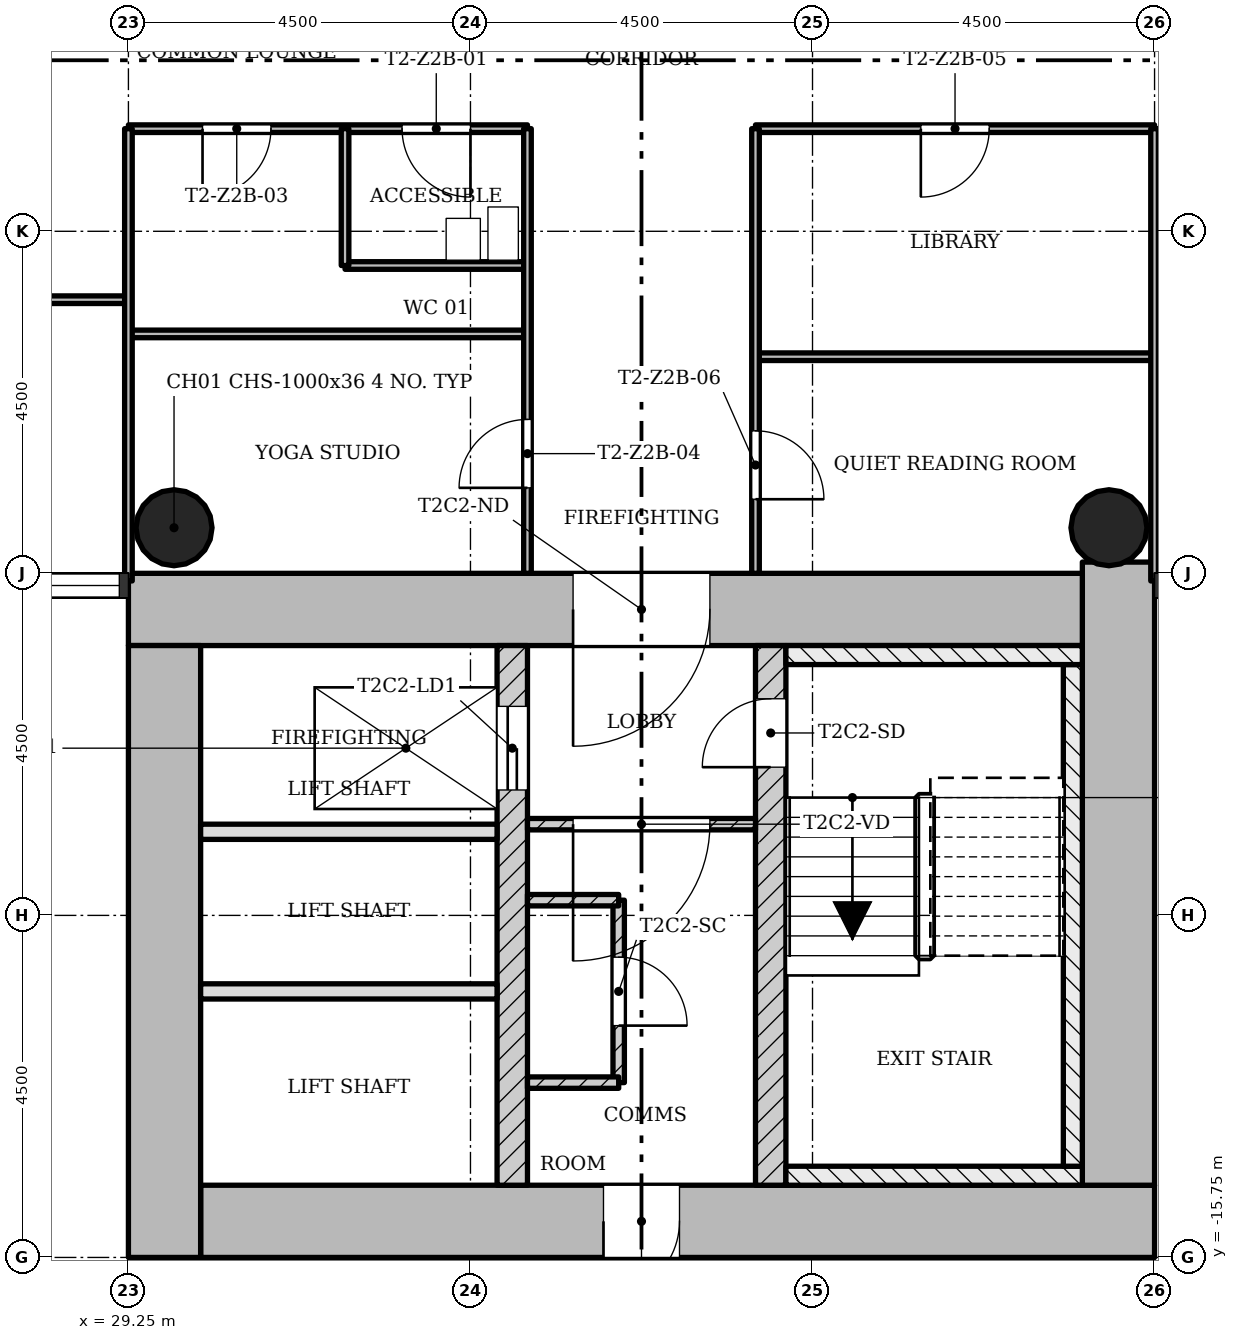
"""IFC4 building model, lengths in metres.
Left out: names, types, materials, properties, quantities, classifications, styles, units other than length and angle.
Written with IfcOpenShell. Run it as: python <this file> out.ifc"""

import sys

from ifc_helpers import new_model, si_unit, direction, frame, frame_2d, origin, origin_2d, place, context, subcontext, project, spatial, rectangle, hollow_circle, extrude, element, fill, save


model = new_model("IFC4")
c1 = context("Model", 3, precision=1e-05, world=origin(), true_north=direction((0.0, 1.0)))
c2 = subcontext(c1, "Body", "Model", "MODEL_VIEW")
j1 = project(units=[si_unit("LENGTHUNIT", "METRE"), si_unit("PLANEANGLEUNIT", "RADIAN")], contexts=[c1])
p1 = place(None, origin())
s1 = spatial("IfcSite", under=j1, at=p1, CompositionType="ELEMENT")
p2 = place(p1, origin())
s2 = spatial("IfcBuilding", under=s1, at=p2, CompositionType="ELEMENT")
p3 = place(p2, frame((0.0, 0.0, 76.6)))
s3 = spatial("IfcBuildingStorey", under=s2, at=p3, CompositionType="ELEMENT", Elevation=76.6)
p4 = place(p3, frame((30.2, -15.275, 0.0), z_axis=(0.0, 0.0, 1.0), x_axis=(1.0, 0.0, 0.0)))
e1 = element("IfcWall", 1, at=p4, inside=s3, PredefinedType="SHEAR", context=c2, shape_type="SweptSolid", body=[
    extrude(rectangle(XDim=12.55, YDim=0.95, at=frame_2d((6.275, 0.0))), origin(), (0.0, 0.0, 1.0), 3.4),
])
p5 = place(p4, frame((5.3, 0.0, 0.0)))
e2 = element("IfcOpeningElement", 2, at=p5, cuts=e1, PredefinedType="OPENING", context=c2, shape_type="SweptSolid", body=[
    extrude(rectangle(XDim=1.0, YDim=2.1, at=frame_2d((0.5, 1.05))), frame((0.0, 0.485, 0.0), z_axis=(0.0, -1.0, 0.0), x_axis=(1.0, 0.0, 0.0)), (0.0, 0.0, 1.0), 0.97),
])
p6 = place(p3, frame((42.275, -14.8, 0.0), z_axis=(0.0, 0.0, 1.0), x_axis=(0.0, 1.0, 0.0)))
e3 = element("IfcWall", 3, at=p6, inside=s3, PredefinedType="SHEAR", context=c2, shape_type="SweptSolid", body=[
    extrude(rectangle(XDim=8.198, YDim=0.95, at=frame_2d((4.099, 0.0))), origin(), (0.0, 0.0, 1.0), 3.4),
])
p7 = place(p3, frame((41.8, -7.225, 0.0), z_axis=(0.0, 0.0, 1.0), x_axis=(-1.0, 0.0, 0.0)))
e4 = element("IfcWall", 4, at=p7, inside=s3, PredefinedType="SHEAR", context=c2, shape_type="SweptSolid", body=[
    extrude(rectangle(XDim=12.55, YDim=0.95, at=frame_2d((6.275, 0.0))), origin(), (0.0, 0.0, 1.0), 3.4),
])
p8 = place(p7, frame((4.9, 0.0, 0.0)))
e5 = element("IfcOpeningElement", 5, at=p8, cuts=e4, PredefinedType="OPENING", context=c2, shape_type="SweptSolid", body=[
    extrude(rectangle(XDim=1.8, YDim=2.1, at=frame_2d((0.9, 1.05))), frame((0.0, 0.485, 0.0), z_axis=(0.0, -1.0, 0.0), x_axis=(1.0, 0.0, 0.0)), (0.0, 0.0, 1.0), 0.97),
])
p9 = place(p3, frame((29.725, -7.7, 0.0), z_axis=(0.0, 0.0, 1.0), x_axis=(0.0, -1.0, 0.0)))
e6 = element("IfcWall", 6, at=p9, inside=s3, PredefinedType="SHEAR", context=c2, shape_type="SweptSolid", body=[
    extrude(rectangle(XDim=8.05, YDim=0.95, at=frame_2d((4.025, 0.0))), origin(), (0.0, 0.0, 1.0), 3.4),
])
p10 = place(p3, frame((34.3, -14.8, 0.0), z_axis=(0.0, 0.0, 1.0), x_axis=(0.0, 1.0, 0.0)))
e7 = element("IfcWall", 7, at=p10, inside=s3, PredefinedType="SHEAR", context=c2, shape_type="SweptSolid", body=[
    extrude(rectangle(XDim=7.1, YDim=0.4, at=frame_2d((3.55, 0.0))), origin(), (0.0, 0.0, 1.0), 3.4),
])
p11 = place(p10, frame((5.2, 0.0, 0.0)))
e8 = element("IfcOpeningElement", 8, at=p11, cuts=e7, PredefinedType="OPENING", context=c2, shape_type="SweptSolid", body=[
    extrude(rectangle(XDim=1.1, YDim=2.1, at=frame_2d((0.55, 1.05))), frame((0.0, 0.21, 0.0), z_axis=(0.0, -1.0, 0.0), x_axis=(1.0, 0.0, 0.0)), (0.0, 0.0, 1.0), 0.42),
])
p12 = place(p3, frame((37.7, -14.8, 0.0), z_axis=(0.0, 0.0, 1.0), x_axis=(0.0, 1.0, 0.0)))
e9 = element("IfcWall", 9, at=p12, inside=s3, PredefinedType="SHEAR", context=c2, shape_type="SweptSolid", body=[
    extrude(rectangle(XDim=7.1, YDim=0.4, at=frame_2d((3.55, 0.0))), origin(), (0.0, 0.0, 1.0), 3.4),
])
p13 = place(p12, frame((5.5, 0.0, 0.0)))
e10 = element("IfcOpeningElement", 10, at=p13, cuts=e9, PredefinedType="OPENING", context=c2, shape_type="SweptSolid", body=[
    extrude(rectangle(XDim=0.9, YDim=2.1, at=frame_2d((0.45, 1.05))), frame((0.0, 0.21, 0.0), z_axis=(0.0, -1.0, 0.0), x_axis=(1.0, 0.0, 0.0)), (0.0, 0.0, 1.0), 0.42),
])
for number, where, z_axis, x_axis in (
    (11, (42.15, -6.15, 0.0), (0.0, 0.0, 1.0), (1.0, 0.0, 0.0)),
    (12, (29.85, -6.15, 0.0), (0.0, 0.0, 1.0), (1.0, 0.0, 0.0)),
):
    element("IfcColumn", number, at=place(p3, frame(where, z_axis=z_axis, x_axis=x_axis)), inside=s3, PredefinedType="COLUMN", context=c2, shape_type="SweptSolid", body=[
        extrude(hollow_circle(Radius=0.5, WallThickness=0.036, at=origin_2d()), origin(), (0.0, 0.0, 1.0), 3.4),
    ])
p14 = place(p3, frame((34.5, -10.05, 0.0), z_axis=(0.0, 0.0, 1.0), x_axis=(1.0, 0.0, 0.0)))
e13 = element("IfcWall", 13, at=p14, inside=s3, PredefinedType="PARTITIONING", context=c2, shape_type="SweptSolid", body=[
    extrude(rectangle(XDim=3.0, YDim=0.15, at=frame_2d((1.5, 0.0))), origin(), (0.0, 0.0, 1.0), 3.0),
])
p15 = place(p14, frame((0.6, 0.0, 0.0)))
e14 = element("IfcOpeningElement", 14, at=p15, cuts=e13, PredefinedType="OPENING", context=c2, shape_type="SweptSolid", body=[
    extrude(rectangle(XDim=1.8, YDim=2.1, at=frame_2d((0.9, 1.05))), frame((0.0, 0.085, 0.0), z_axis=(0.0, -1.0, 0.0), x_axis=(1.0, 0.0, 0.0)), (0.0, 0.0, 1.0), 0.17),
])
for number, where, z_axis, x_axis in (
    (15, (30.2, -10.15, 0.0), (0.0, 0.0, 1.0), (1.0, 0.0, 0.0)),
    (16, (30.2, -12.25, 0.0), (0.0, 0.0, 1.0), (1.0, 0.0, 0.0)),
):
    element("IfcWall", number, at=place(p3, frame(where, z_axis=z_axis, x_axis=x_axis)), inside=s3, PredefinedType="SOLIDWALL", context=c2, shape_type="SweptSolid", body=[
        extrude(rectangle(XDim=3.9, YDim=0.2, at=frame_2d((1.95, 0.0))), origin(), (0.0, 0.0, 1.0), 3.0),
    ])
p16 = place(p3, frame((35.7, -11.05, 0.0), z_axis=(0.0, 0.0, 1.0), x_axis=(0.0, -1.0, 0.0)))
e17 = element("IfcWall", 17, at=p16, inside=s3, PredefinedType="PARTITIONING", context=c2, shape_type="SweptSolid", body=[
    extrude(rectangle(XDim=2.4, YDim=0.15, at=frame_2d((1.2, 0.0))), origin(), (0.0, 0.0, 1.0), 3.0),
])
p17 = place(p16, frame((0.75, 0.0, 0.0)))
e18 = element("IfcOpeningElement", 18, at=p17, cuts=e17, PredefinedType="OPENING", context=c2, shape_type="SweptSolid", body=[
    extrude(rectangle(XDim=0.9, YDim=2.1, at=frame_2d((0.45, 1.05))), frame((0.0, 0.085, 0.0), z_axis=(0.0, -1.0, 0.0), x_axis=(1.0, 0.0, 0.0)), (0.0, 0.0, 1.0), 0.17),
])
for number, where, z_axis, x_axis in (
    (19, (35.7, -11.05, 0.0), (0.0, 0.0, 1.0), (-1.0, 0.0, 0.0)),
    (20, (35.7, -13.45, 0.0), (0.0, 0.0, 1.0), (-1.0, 0.0, 0.0)),
):
    element("IfcWall", number, at=place(p3, frame(where, z_axis=z_axis, x_axis=x_axis)), inside=s3, PredefinedType="PARTITIONING", context=c2, shape_type="SweptSolid", body=[
        extrude(rectangle(XDim=1.2, YDim=0.15, at=frame_2d((0.6, 0.0))), origin(), (0.0, 0.0, 1.0), 3.0),
    ])
for number, where, z_axis, x_axis in (
    (21, (42.75, -3.9, 0.0), (0.0, 0.0, 1.0), (-1.0, 0.0, 0.0)),
    (22, (34.5, -3.6, 0.0), (0.0, 0.0, 1.0), (-1.0, 0.0, 0.0)),
):
    element("IfcWall", number, at=place(p3, frame(where, z_axis=z_axis, x_axis=x_axis)), inside=s3, PredefinedType="PARTITIONING", context=c2, shape_type="SweptSolid", body=[
        extrude(rectangle(XDim=5.25, YDim=0.1, at=frame_2d((2.625, 0.0))), origin(), (0.0, 0.0, 1.0), 3.0),
    ])
p18 = place(p3, frame((51.75, -3.15, 0.0), z_axis=(0.0, 0.0, 1.0), x_axis=(-1.0, 0.0, 0.0)))
e23 = element("IfcWall", 23, at=p18, inside=s3, PredefinedType="PARTITIONING", context=c2, shape_type="SweptSolid", body=[
    extrude(rectangle(XDim=9.0, YDim=0.1, at=frame_2d((4.5, 0.0))), origin(), (0.0, 0.0, 1.0), 3.0),
])
p19 = place(p18, frame((5.55, 0.0, 0.0)))
e24 = element("IfcOpeningElement", 24, at=p19, cuts=e23, PredefinedType="OPENING", context=c2, shape_type="SweptSolid", body=[
    extrude(rectangle(XDim=0.9, YDim=2.1, at=frame_2d((0.45, 1.05))), frame((0.0, 0.06, 0.0), z_axis=(0.0, -1.0, 0.0), x_axis=(1.0, 0.0, 0.0)), (0.0, 0.0, 1.0), 0.12),
])
p20 = place(p3, frame((29.25, -3.15, 0.0), z_axis=(0.0, 0.0, 1.0), x_axis=(-1.0, 0.0, 0.0)))
e25 = element("IfcWall", 25, at=p20, inside=s3, PredefinedType="PARTITIONING", context=c2, shape_type="SweptSolid", body=[
    extrude(rectangle(XDim=9.0, YDim=0.1, at=frame_2d((4.5, 0.0))), origin(), (0.0, 0.0, 1.0), 3.0),
])
p21 = place(p20, frame((2.55, 0.0, 0.0)))
e26 = element("IfcOpeningElement", 26, at=p21, cuts=e25, PredefinedType="OPENING", context=c2, shape_type="SweptSolid", body=[
    extrude(rectangle(XDim=0.9, YDim=2.1, at=frame_2d((0.45, 1.05))), frame((0.0, 0.06, 0.0), z_axis=(0.0, -1.0, 0.0), x_axis=(1.0, 0.0, 0.0)), (0.0, 0.0, 1.0), 0.12),
])
p22 = place(p3, frame((34.5, -2.7, 0.0), z_axis=(0.0, 0.0, 1.0), x_axis=(-1.0, 0.0, 0.0)))
e27 = element("IfcWall", 27, at=p22, inside=s3, PredefinedType="PARTITIONING", context=c2, shape_type="SweptSolid", body=[
    extrude(rectangle(XDim=2.4, YDim=0.1, at=frame_2d((1.2, 0.0))), origin(), (0.0, 0.0, 1.0), 3.0),
])
p23 = place(p3, frame((42.75, -0.9, 0.0), z_axis=(0.0, 0.0, 1.0), x_axis=(-1.0, 0.0, 0.0)))
e28 = element("IfcWall", 28, at=p23, inside=s3, PredefinedType="PARTITIONING", context=c2, shape_type="SweptSolid", body=[
    extrude(rectangle(XDim=5.25, YDim=0.1, at=frame_2d((2.625, 0.0))), origin(), (0.0, 0.0, 1.0), 3.0),
])
p24 = place(p23, frame((2.175, 0.0, 0.0)))
e29 = element("IfcOpeningElement", 29, at=p24, cuts=e28, PredefinedType="OPENING", context=c2, shape_type="SweptSolid", body=[
    extrude(rectangle(XDim=0.9, YDim=2.1, at=frame_2d((0.45, 1.05))), frame((0.0, 0.06, 0.0), z_axis=(0.0, -1.0, 0.0), x_axis=(1.0, 0.0, 0.0)), (0.0, 0.0, 1.0), 0.12),
])
p25 = place(p3, frame((34.5, -0.9, 0.0), z_axis=(0.0, 0.0, 1.0), x_axis=(-1.0, 0.0, 0.0)))
e30 = element("IfcWall", 30, at=p25, inside=s3, PredefinedType="PARTITIONING", context=c2, shape_type="SweptSolid", body=[
    extrude(rectangle(XDim=5.25, YDim=0.1, at=frame_2d((2.625, 0.0))), origin(), (0.0, 0.0, 1.0), 3.0),
])
p26 = place(p25, frame((0.75, 0.0, 0.0)))
e31 = element("IfcOpeningElement", 31, at=p26, cuts=e30, PredefinedType="OPENING", context=c2, shape_type="SweptSolid", body=[
    extrude(rectangle(XDim=0.9, YDim=2.1, at=frame_2d((0.45, 1.05))), frame((0.0, 0.06, 0.0), z_axis=(0.0, -1.0, 0.0), x_axis=(1.0, 0.0, 0.0)), (0.0, 0.0, 1.0), 0.12),
])
p27 = place(p25, frame((3.375, 0.0, 0.0)))
e32 = element("IfcOpeningElement", 32, at=p27, cuts=e30, PredefinedType="OPENING", context=c2, shape_type="SweptSolid", body=[
    extrude(rectangle(XDim=0.9, YDim=2.1, at=frame_2d((0.45, 1.05))), frame((0.0, 0.06, 0.0), z_axis=(0.0, -1.0, 0.0), x_axis=(1.0, 0.0, 0.0)), (0.0, 0.0, 1.0), 0.12),
])
p28 = place(p3, frame((42.75, -6.85, 0.0), z_axis=(0.0, 0.0, 1.0), x_axis=(0.0, 1.0, 0.0)))
e33 = element("IfcWall", 33, at=p28, inside=s3, PredefinedType="PARTITIONING", context=c2, shape_type="SweptSolid", body=[
    extrude(rectangle(XDim=5.95, YDim=0.1, at=frame_2d((2.975, 0.0))), origin(), (0.0, 0.0, 1.0), 3.0),
])
p29 = place(p3, frame((37.5, -6.75, 0.0), z_axis=(0.0, 0.0, 1.0), x_axis=(0.0, 1.0, 0.0)))
e34 = element("IfcWall", 34, at=p29, inside=s3, PredefinedType="PARTITIONING", context=c2, shape_type="SweptSolid", body=[
    extrude(rectangle(XDim=5.85, YDim=0.1, at=frame_2d((2.925, 0.0))), origin(), (0.0, 0.0, 1.0), 3.0),
])
p30 = place(p29, frame((0.975, 0.0, 0.0)))
e35 = element("IfcOpeningElement", 35, at=p30, cuts=e34, PredefinedType="OPENING", context=c2, shape_type="SweptSolid", body=[
    extrude(rectangle(XDim=0.9, YDim=2.1, at=frame_2d((0.45, 1.05))), frame((0.0, 0.06, 0.0), z_axis=(0.0, -1.0, 0.0), x_axis=(1.0, 0.0, 0.0)), (0.0, 0.0, 1.0), 0.12),
])
p31 = place(p3, frame((34.5, -6.75, 0.0), z_axis=(0.0, 0.0, 1.0), x_axis=(0.0, 1.0, 0.0)))
e36 = element("IfcWall", 36, at=p31, inside=s3, PredefinedType="PARTITIONING", context=c2, shape_type="SweptSolid", body=[
    extrude(rectangle(XDim=5.85, YDim=0.1, at=frame_2d((2.925, 0.0))), origin(), (0.0, 0.0, 1.0), 3.0),
])
p32 = place(p31, frame((1.125, 0.0, 0.0)))
e37 = element("IfcOpeningElement", 37, at=p32, cuts=e36, PredefinedType="OPENING", context=c2, shape_type="SweptSolid", body=[
    extrude(rectangle(XDim=0.9, YDim=2.1, at=frame_2d((0.45, 1.05))), frame((0.0, 0.06, 0.0), z_axis=(0.0, -1.0, 0.0), x_axis=(1.0, 0.0, 0.0)), (0.0, 0.0, 1.0), 0.12),
])
p33 = place(p3, frame((32.1, -2.7, 0.0), z_axis=(0.0, 0.0, 1.0), x_axis=(0.0, 1.0, 0.0)))
e38 = element("IfcWall", 38, at=p33, inside=s3, PredefinedType="PARTITIONING", context=c2, shape_type="SweptSolid", body=[
    extrude(rectangle(XDim=1.8, YDim=0.1, at=frame_2d((0.9, 0.0))), origin(), (0.0, 0.0, 1.0), 3.0),
])
p34 = place(p3, frame((29.25, -6.85, 0.0), z_axis=(0.0, 0.0, 1.0), x_axis=(0.0, 1.0, 0.0)))
e39 = element("IfcWall", 39, at=p34, inside=s3, PredefinedType="PARTITIONING", context=c2, shape_type="SweptSolid", body=[
    extrude(rectangle(XDim=5.95, YDim=0.1, at=frame_2d((2.975, 0.0))), origin(), (0.0, 0.0, 1.0), 3.0),
])
p35 = place(p3, frame((37.9, -14.675, 0.0), z_axis=(0.0, 0.0, 1.0), x_axis=(1.0, 0.0, 0.0)))
e40 = element("IfcWall", 40, at=p35, inside=s3, PredefinedType="SHEAR", context=c2, shape_type="SweptSolid", body=[
    extrude(rectangle(XDim=3.9, YDim=0.25, at=frame_2d((1.95, 0.0))), origin(), (0.0, 0.0, 1.0), 3.4),
])
p36 = place(p3, frame((41.675, -7.95, 0.0), z_axis=(0.0, 0.0, 1.0), x_axis=(0.0, -1.0, 0.0)))
e41 = element("IfcWall", 41, at=p36, inside=s3, PredefinedType="SHEAR", context=c2, shape_type="SweptSolid", body=[
    extrude(rectangle(XDim=6.6, YDim=0.25, at=frame_2d((3.3, 0.0))), origin(), (0.0, 0.0, 1.0), 3.4),
])
p37 = place(p3, frame((37.9, -7.825, 0.0), z_axis=(0.0, 0.0, 1.0), x_axis=(1.0, 0.0, 0.0)))
e42 = element("IfcWall", 42, at=p37, inside=s3, PredefinedType="SHEAR", context=c2, shape_type="SweptSolid", body=[
    extrude(rectangle(XDim=3.9, YDim=0.25, at=frame_2d((1.95, 0.0))), origin(), (0.0, 0.0, 1.0), 3.4),
])
p38 = place(p5, origin())
e43 = element("IfcDoor", 43, at=p38, inside=s3, OperationType="SINGLE_SWING_LEFT", PredefinedType="DOOR", context=c2, shape_type="SweptSolid", body=[
    extrude(rectangle(XDim=1.0, YDim=2.1, at=frame_2d((0.5, 1.05))), frame((0.0, 0.025, 0.0), z_axis=(0.0, -1.0, 0.0), x_axis=(1.0, 0.0, 0.0)), (0.0, 0.0, 1.0), 0.05),
])
fill(e2, e43)
p39 = place(p15, origin())
e44 = element("IfcDoor", 44, at=p39, inside=s3, OperationType="SINGLE_SWING_LEFT", PredefinedType="DOOR", context=c2, shape_type="SweptSolid", body=[
    extrude(rectangle(XDim=1.8, YDim=2.1, at=frame_2d((0.9, 1.05))), frame((0.0, 0.025, 0.0), z_axis=(0.0, -1.0, 0.0), x_axis=(1.0, 0.0, 0.0)), (0.0, 0.0, 1.0), 0.05),
])
fill(e14, e44)
p40 = place(p17, origin())
e45 = element("IfcDoor", 45, at=p40, inside=s3, OperationType="SINGLE_SWING_LEFT", PredefinedType="DOOR", context=c2, shape_type="SweptSolid", body=[
    extrude(rectangle(XDim=0.9, YDim=2.1, at=frame_2d((0.45, 1.05))), frame((0.0, 0.025, 0.0), z_axis=(0.0, -1.0, 0.0), x_axis=(1.0, 0.0, 0.0)), (0.0, 0.0, 1.0), 0.05),
])
fill(e18, e45)
p41 = place(p26, origin())
e46 = element("IfcDoor", 46, at=p41, inside=s3, OperationType="SINGLE_SWING_RIGHT", PredefinedType="DOOR", context=c2, shape_type="SweptSolid", body=[
    extrude(rectangle(XDim=0.9, YDim=2.1, at=frame_2d((0.45, 1.05))), frame((0.0, 0.025, 0.0), z_axis=(0.0, -1.0, 0.0), x_axis=(1.0, 0.0, 0.0)), (0.0, 0.0, 1.0), 0.05),
])
fill(e31, e46)
p42 = place(p27, origin())
e47 = element("IfcDoor", 47, at=p42, inside=s3, OperationType="SINGLE_SWING_LEFT", PredefinedType="DOOR", context=c2, shape_type="SweptSolid", body=[
    extrude(rectangle(XDim=0.9, YDim=2.1, at=frame_2d((0.45, 1.05))), frame((0.0, 0.025, 0.0), z_axis=(0.0, -1.0, 0.0), x_axis=(1.0, 0.0, 0.0)), (0.0, 0.0, 1.0), 0.05),
])
fill(e32, e47)
p43 = place(p32, origin())
e48 = element("IfcDoor", 48, at=p43, inside=s3, OperationType="SINGLE_SWING_RIGHT", PredefinedType="DOOR", context=c2, shape_type="SweptSolid", body=[
    extrude(rectangle(XDim=0.9, YDim=2.1, at=frame_2d((0.45, 1.05))), frame((0.0, 0.025, 0.0), z_axis=(0.0, -1.0, 0.0), x_axis=(1.0, 0.0, 0.0)), (0.0, 0.0, 1.0), 0.05),
])
fill(e37, e48)
p44 = place(p24, origin())
e49 = element("IfcDoor", 49, at=p44, inside=s3, OperationType="SINGLE_SWING_LEFT", PredefinedType="DOOR", context=c2, shape_type="SweptSolid", body=[
    extrude(rectangle(XDim=0.9, YDim=2.1, at=frame_2d((0.45, 1.05))), frame((0.0, 0.025, 0.0), z_axis=(0.0, -1.0, 0.0), x_axis=(1.0, 0.0, 0.0)), (0.0, 0.0, 1.0), 0.05),
])
fill(e29, e49)
p45 = place(p30, origin())
e50 = element("IfcDoor", 50, at=p45, inside=s3, OperationType="SINGLE_SWING_LEFT", PredefinedType="DOOR", context=c2, shape_type="SweptSolid", body=[
    extrude(rectangle(XDim=0.9, YDim=2.1, at=frame_2d((0.45, 1.05))), frame((0.0, 0.025, 0.0), z_axis=(0.0, -1.0, 0.0), x_axis=(1.0, 0.0, 0.0)), (0.0, 0.0, 1.0), 0.05),
])
fill(e35, e50)
p46 = place(p13, origin())
e51 = element("IfcDoor", 51, at=p46, inside=s3, OperationType="SINGLE_SWING_RIGHT", PredefinedType="DOOR", context=c2, shape_type="SweptSolid", body=[
    extrude(rectangle(XDim=0.9, YDim=2.1, at=frame_2d((0.45, 1.05))), frame((0.0, 0.025, 0.0), z_axis=(0.0, -1.0, 0.0), x_axis=(1.0, 0.0, 0.0)), (0.0, 0.0, 1.0), 0.05),
])
fill(e10, e51)
p47 = place(p11, origin())
e52 = element("IfcDoor", 52, at=p47, inside=s3, OperationType="SLIDING_TO_LEFT", PredefinedType="DOOR", context=c2, shape_type="SweptSolid", body=[
    extrude(rectangle(XDim=1.1, YDim=2.1, at=frame_2d((0.55, 1.05))), frame((0.0, 0.025, 0.0), z_axis=(0.0, -1.0, 0.0), x_axis=(1.0, 0.0, 0.0)), (0.0, 0.0, 1.0), 0.05),
])
fill(e8, e52)
p48 = place(p8, origin())
e53 = element("IfcDoor", 53, at=p48, inside=s3, OperationType="SINGLE_SWING_LEFT", PredefinedType="DOOR", context=c2, shape_type="SweptSolid", body=[
    extrude(rectangle(XDim=1.8, YDim=2.1, at=frame_2d((0.9, 1.05))), frame((0.0, 0.025, 0.0), z_axis=(0.0, -1.0, 0.0), x_axis=(1.0, 0.0, 0.0)), (0.0, 0.0, 1.0), 0.05),
])
fill(e5, e53)
save(model, sys.argv[1])
